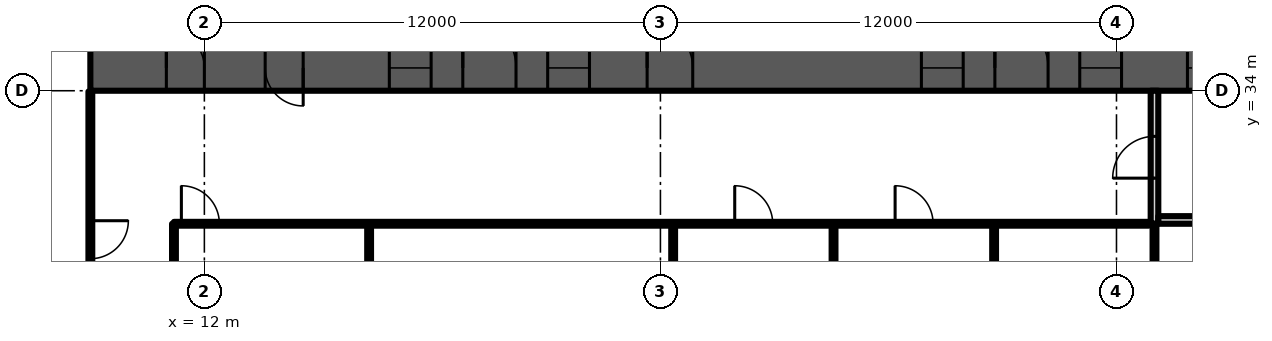
"""IFC4 building model, lengths in metres.
Left out: names, types, materials, properties, quantities, classifications, styles, units other than length and angle.
Written with IfcOpenShell. Run it as: python <this file> out.ifc"""

import sys

from ifc_helpers import new_model, si_unit, direction, frame, frame_2d, origin, place, context, subcontext, project, spatial, rectangle, extrude, element, fill, save


model = new_model("IFC4")
c1 = context("Model", 3, precision=1e-05, world=origin(), true_north=direction((0.0, 1.0)))
c2 = subcontext(c1, "Body", "Model", "MODEL_VIEW")
j1 = project(units=[si_unit("LENGTHUNIT", "METRE"), si_unit("PLANEANGLEUNIT", "RADIAN")], contexts=[c1])
p1 = place(None, origin())
s1 = spatial("IfcSite", under=j1, at=p1, CompositionType="ELEMENT")
p2 = place(p1, origin())
s2 = spatial("IfcBuilding", under=s1, at=p2, CompositionType="ELEMENT")
p3 = place(p2, frame((0.0, 0.0, 59.5)))
s3 = spatial("IfcBuildingStorey", under=s2, at=p3, CompositionType="ELEMENT", Elevation=59.5)
p4 = place(p3, frame((9.0, 34.6, 0.0), z_axis=(0.0, 0.0, 1.0), x_axis=(1.0, 0.0, 0.0)))
e1 = element("IfcWall", 1, at=p4, inside=s3, PredefinedType="SHEAR", context=c2, shape_type="SweptSolid", body=[
    extrude(rectangle(XDim=56.0, YDim=1.2, at=frame_2d((28.0, 0.0))), origin(), (0.0, 0.0, 1.0), 3.6),
])
p5 = place(p4, frame((2.0, 0.0, 0.0)))
e2 = element("IfcOpeningElement", 2, at=p5, cuts=e1, PredefinedType="OPENING", context=c2, shape_type="SweptSolid", body=[
    extrude(rectangle(XDim=1.0, YDim=2.1, at=frame_2d((0.5, 1.05))), frame((0.0, 0.61, 0.0), z_axis=(0.0, -1.0, 0.0), x_axis=(1.0, 0.0, 0.0)), (0.0, 0.0, 1.0), 1.22),
])
p6 = place(p4, frame((4.6, 0.0, 0.0)))
e3 = element("IfcOpeningElement", 3, at=p6, cuts=e1, PredefinedType="OPENING", context=c2, shape_type="SweptSolid", body=[
    extrude(rectangle(XDim=1.0, YDim=2.1, at=frame_2d((0.5, 1.05))), frame((0.0, 0.61, 0.0), z_axis=(0.0, -1.0, 0.0), x_axis=(1.0, 0.0, 0.0)), (0.0, 0.0, 1.0), 1.22),
])
p7 = place(p4, frame((7.867, 0.0, 0.0)))
e4 = element("IfcOpeningElement", 4, at=p7, cuts=e1, PredefinedType="OPENING", context=c2, shape_type="SweptSolid", body=[
    extrude(rectangle(XDim=1.1, YDim=2.1, at=frame_2d((0.55, 1.05))), frame((0.0, 0.61, 0.0), z_axis=(0.0, -1.0, 0.0), x_axis=(1.0, 0.0, 0.0)), (0.0, 0.0, 1.0), 1.22),
])
p8 = place(p4, frame((12.033, 0.0, 0.0)))
e5 = element("IfcOpeningElement", 5, at=p8, cuts=e1, PredefinedType="OPENING", context=c2, shape_type="SweptSolid", body=[
    extrude(rectangle(XDim=1.1, YDim=2.1, at=frame_2d((0.55, 1.05))), frame((0.0, 0.61, 0.0), z_axis=(0.0, -1.0, 0.0), x_axis=(1.0, 0.0, 0.0)), (0.0, 0.0, 1.0), 1.22),
])
p9 = place(p4, frame((9.8, 0.0, 0.0)))
e6 = element("IfcOpeningElement", 6, at=p9, cuts=e1, PredefinedType="OPENING", context=c2, shape_type="SweptSolid", body=[
    extrude(rectangle(XDim=1.4, YDim=2.1, at=frame_2d((0.7, 1.05))), frame((0.0, 0.61, 0.0), z_axis=(0.0, -1.0, 0.0), x_axis=(1.0, 0.0, 0.0)), (0.0, 0.0, 1.0), 1.22),
])
p10 = place(p4, frame((14.65, 0.0, 0.0)))
e7 = element("IfcOpeningElement", 7, at=p10, cuts=e1, PredefinedType="OPENING", context=c2, shape_type="SweptSolid", body=[
    extrude(rectangle(XDim=1.2, YDim=2.1, at=frame_2d((0.6, 1.05))), frame((0.0, 0.61, 0.0), z_axis=(0.0, -1.0, 0.0), x_axis=(1.0, 0.0, 0.0)), (0.0, 0.0, 1.0), 1.22),
])
p11 = place(p4, frame((21.867, 0.0, 0.0)))
e8 = element("IfcOpeningElement", 8, at=p11, cuts=e1, PredefinedType="OPENING", context=c2, shape_type="SweptSolid", body=[
    extrude(rectangle(XDim=1.1, YDim=2.1, at=frame_2d((0.55, 1.05))), frame((0.0, 0.61, 0.0), z_axis=(0.0, -1.0, 0.0), x_axis=(1.0, 0.0, 0.0)), (0.0, 0.0, 1.0), 1.22),
])
p12 = place(p4, frame((26.033, 0.0, 0.0)))
e9 = element("IfcOpeningElement", 9, at=p12, cuts=e1, PredefinedType="OPENING", context=c2, shape_type="SweptSolid", body=[
    extrude(rectangle(XDim=1.1, YDim=2.1, at=frame_2d((0.55, 1.05))), frame((0.0, 0.61, 0.0), z_axis=(0.0, -1.0, 0.0), x_axis=(1.0, 0.0, 0.0)), (0.0, 0.0, 1.0), 1.22),
])
p13 = place(p4, frame((23.8, 0.0, 0.0)))
e10 = element("IfcOpeningElement", 10, at=p13, cuts=e1, PredefinedType="OPENING", context=c2, shape_type="SweptSolid", body=[
    extrude(rectangle(XDim=1.4, YDim=2.1, at=frame_2d((0.7, 1.05))), frame((0.0, 0.61, 0.0), z_axis=(0.0, -1.0, 0.0), x_axis=(1.0, 0.0, 0.0)), (0.0, 0.0, 1.0), 1.22),
])
p14 = place(p4, frame((28.867, 0.0, 0.0)))
e11 = element("IfcOpeningElement", 11, at=p14, cuts=e1, PredefinedType="OPENING", context=c2, shape_type="SweptSolid", body=[
    extrude(rectangle(XDim=1.1, YDim=2.1, at=frame_2d((0.55, 1.05))), frame((0.0, 0.61, 0.0), z_axis=(0.0, -1.0, 0.0), x_axis=(1.0, 0.0, 0.0)), (0.0, 0.0, 1.0), 1.22),
])
p15 = place(p4, frame((33.033, 0.0, 0.0)))
e12 = element("IfcOpeningElement", 12, at=p15, cuts=e1, PredefinedType="OPENING", context=c2, shape_type="SweptSolid", body=[
    extrude(rectangle(XDim=1.1, YDim=2.1, at=frame_2d((0.55, 1.05))), frame((0.0, 0.61, 0.0), z_axis=(0.0, -1.0, 0.0), x_axis=(1.0, 0.0, 0.0)), (0.0, 0.0, 1.0), 1.22),
])
p16 = place(p4, frame((40.15, 0.0, 0.0)))
e13 = element("IfcOpeningElement", 13, at=p16, cuts=e1, PredefinedType="OPENING", context=c2, shape_type="SweptSolid", body=[
    extrude(rectangle(XDim=1.2, YDim=2.1, at=frame_2d((0.6, 1.05))), frame((0.0, 0.61, 0.0), z_axis=(0.0, -1.0, 0.0), x_axis=(1.0, 0.0, 0.0)), (0.0, 0.0, 1.0), 1.22),
])
p17 = place(p4, frame((44.8, 0.0, 0.0)))
e14 = element("IfcOpeningElement", 14, at=p17, cuts=e1, PredefinedType="OPENING", context=c2, shape_type="SweptSolid", body=[
    extrude(rectangle(XDim=1.4, YDim=2.1, at=frame_2d((0.7, 1.05))), frame((0.0, 0.61, 0.0), z_axis=(0.0, -1.0, 0.0), x_axis=(1.0, 0.0, 0.0)), (0.0, 0.0, 1.0), 1.22),
])
p18 = place(p4, frame((49.867, 0.0, 0.0)))
e15 = element("IfcOpeningElement", 15, at=p18, cuts=e1, PredefinedType="OPENING", context=c2, shape_type="SweptSolid", body=[
    extrude(rectangle(XDim=1.1, YDim=2.1, at=frame_2d((0.55, 1.05))), frame((0.0, 0.61, 0.0), z_axis=(0.0, -1.0, 0.0), x_axis=(1.0, 0.0, 0.0)), (0.0, 0.0, 1.0), 1.22),
])
p19 = place(p4, frame((53.5, 0.0, 0.0)))
e16 = element("IfcOpeningElement", 16, at=p19, cuts=e1, PredefinedType="OPENING", context=c2, shape_type="SweptSolid", body=[
    extrude(rectangle(XDim=1.1, YDim=2.1, at=frame_2d((0.55, 1.05))), frame((0.0, 0.61, 0.0), z_axis=(0.0, -1.0, 0.0), x_axis=(1.0, 0.0, 0.0)), (0.0, 0.0, 1.0), 1.22),
])
p20 = place(p4, frame((51.567, 0.0, 0.0)))
e17 = element("IfcOpeningElement", 17, at=p20, cuts=e1, PredefinedType="OPENING", context=c2, shape_type="SweptSolid", body=[
    extrude(rectangle(XDim=1.4, YDim=2.1, at=frame_2d((0.7, 1.05))), frame((0.0, 0.61, 0.0), z_axis=(0.0, -1.0, 0.0), x_axis=(1.0, 0.0, 0.0)), (0.0, 0.0, 1.0), 1.22),
])
p21 = place(p3, frame((37.0, 30.5, 0.0), z_axis=(0.0, 0.0, 1.0), x_axis=(0.0, 1.0, 0.0)))
e18 = element("IfcWall", 18, at=p21, inside=s3, PredefinedType="PARTITIONING", context=c2, shape_type="SweptSolid", body=[
    extrude(rectangle(XDim=3.5, YDim=0.2, at=frame_2d((1.75, 0.0))), origin(), (0.0, 0.0, 1.0), 3.2),
])
p22 = place(p21, frame((1.2, 0.0, 0.0)))
e19 = element("IfcOpeningElement", 19, at=p22, cuts=e18, PredefinedType="OPENING", context=c2, shape_type="SweptSolid", body=[
    extrude(rectangle(XDim=1.1, YDim=2.1, at=frame_2d((0.55, 1.05))), frame((0.0, 0.11, 0.0), z_axis=(0.0, -1.0, 0.0), x_axis=(1.0, 0.0, 0.0)), (0.0, 0.0, 1.0), 0.22),
])
p23 = place(p3, frame((37.1, 30.6, 0.0), z_axis=(0.0, 0.0, 1.0), x_axis=(1.0, 0.0, 0.0)))
e20 = element("IfcWall", 20, at=p23, inside=s3, PredefinedType="PARTITIONING", context=c2, shape_type="SweptSolid", body=[
    extrude(rectangle(XDim=2.8, YDim=0.2, at=frame_2d((1.4, 0.0))), origin(), (0.0, 0.0, 1.0), 3.2),
])
p24 = place(p3, frame((9.0, 26.05, 0.0), z_axis=(0.0, 0.0, 1.0), x_axis=(0.0, 1.0, 0.0)))
e21 = element("IfcWall", 21, at=p24, inside=s3, PredefinedType="PARTITIONING", context=c2, shape_type="SweptSolid", body=[
    extrude(rectangle(XDim=7.93, YDim=0.1, at=frame_2d((3.965, 0.0))), origin(), (0.0, 0.0, 1.0), 3.2),
])
p25 = place(p24, frame((3.53, 0.0, 0.0)))
e22 = element("IfcOpeningElement", 22, at=p25, cuts=e21, PredefinedType="OPENING", context=c2, shape_type="SweptSolid", body=[
    extrude(rectangle(XDim=1.0, YDim=2.1, at=frame_2d((0.5, 1.05))), frame((0.0, 0.06, 0.0), z_axis=(0.0, -1.0, 0.0), x_axis=(1.0, 0.0, 0.0)), (0.0, 0.0, 1.0), 0.12),
])
p26 = place(p3, frame((11.2, 23.515, 0.0), z_axis=(0.0, 0.0, 1.0), x_axis=(0.0, 1.0, 0.0)))
e23 = element("IfcWall", 23, at=p26, inside=s3, PredefinedType="PARTITIONING", context=c2, shape_type="SweptSolid", body=[
    extrude(rectangle(XDim=6.985, YDim=0.1, at=frame_2d((3.493, 0.0))), origin(), (0.0, 0.0, 1.0), 3.2),
])
p27 = place(p3, frame((11.2, 30.5, 0.0), z_axis=(0.0, 0.0, 1.0), x_axis=(1.0, 0.0, 0.0)))
e24 = element("IfcWall", 24, at=p27, inside=s3, PredefinedType="PARTITIONING", context=c2, shape_type="SweptSolid", body=[
    extrude(rectangle(XDim=25.65, YDim=0.1, at=frame_2d((12.825, 0.0))), origin(), (0.0, 0.0, 1.0), 3.2),
])
p28 = place(p27, frame((0.195, 0.0, 0.0)))
e25 = element("IfcOpeningElement", 25, at=p28, cuts=e24, PredefinedType="OPENING", context=c2, shape_type="SweptSolid", body=[
    extrude(rectangle(XDim=1.0, YDim=2.1, at=frame_2d((0.5, 1.05))), frame((0.0, 0.06, 0.0), z_axis=(0.0, -1.0, 0.0), x_axis=(1.0, 0.0, 0.0)), (0.0, 0.0, 1.0), 0.12),
])
p29 = place(p27, frame((14.755, 0.0, 0.0)))
e26 = element("IfcOpeningElement", 26, at=p29, cuts=e24, PredefinedType="OPENING", context=c2, shape_type="SweptSolid", body=[
    extrude(rectangle(XDim=1.0, YDim=2.1, at=frame_2d((0.5, 1.05))), frame((0.0, 0.06, 0.0), z_axis=(0.0, -1.0, 0.0), x_axis=(1.0, 0.0, 0.0)), (0.0, 0.0, 1.0), 0.12),
])
p30 = place(p27, frame((18.975, 0.0, 0.0)))
e27 = element("IfcOpeningElement", 27, at=p30, cuts=e24, PredefinedType="OPENING", context=c2, shape_type="SweptSolid", body=[
    extrude(rectangle(XDim=1.0, YDim=2.1, at=frame_2d((0.5, 1.05))), frame((0.0, 0.06, 0.0), z_axis=(0.0, -1.0, 0.0), x_axis=(1.0, 0.0, 0.0)), (0.0, 0.0, 1.0), 0.12),
])
for number, where, z_axis, x_axis in (
    (28, (16.335, 20.445, 0.0), (0.0, 0.0, 1.0), (0.0, 1.0, 0.0)),
    (29, (24.335, 20.445, 0.0), (0.0, 0.0, 1.0), (0.0, 1.0, 0.0)),
    (30, (28.555, 20.445, 0.0), (0.0, 0.0, 1.0), (0.0, 1.0, 0.0)),
    (31, (32.78, 20.445, 0.0), (0.0, 0.0, 1.0), (0.0, 1.0, 0.0)),
    (32, (37.0, 20.445, 0.0), (0.0, 0.0, 1.0), (0.0, 1.0, 0.0)),
):
    element("IfcWall", number, at=place(p3, frame(where, z_axis=z_axis, x_axis=x_axis)), inside=s3, PredefinedType="PARTITIONING", context=c2, shape_type="SweptSolid", body=[
        extrude(rectangle(XDim=10.055, YDim=0.1, at=frame_2d((5.027, 0.0))), origin(), (0.0, 0.0, 1.0), 3.2),
    ])
p31 = place(p5, origin())
e33 = element("IfcDoor", 33, at=p31, inside=s3, OperationType="SINGLE_SWING_LEFT", PredefinedType="DOOR", context=c2, shape_type="SweptSolid", body=[
    extrude(rectangle(XDim=1.0, YDim=2.1, at=frame_2d((0.5, 1.05))), frame((0.0, 0.6, 0.0), z_axis=(0.0, -1.0, 0.0), x_axis=(1.0, 0.0, 0.0)), (0.0, 0.0, 1.0), 1.199),
])
fill(e2, e33)
p32 = place(p6, origin())
e34 = element("IfcDoor", 34, at=p32, inside=s3, OperationType="SINGLE_SWING_RIGHT", PredefinedType="DOOR", context=c2, shape_type="SweptSolid", body=[
    extrude(rectangle(XDim=1.0, YDim=2.1, at=frame_2d((0.5, 1.05))), frame((0.0, 0.6, 0.0), z_axis=(0.0, -1.0, 0.0), x_axis=(1.0, 0.0, 0.0)), (0.0, 0.0, 1.0), 1.199),
])
fill(e3, e34)
p33 = place(p7, origin())
e35 = element("IfcDoor", 35, at=p33, inside=s3, OperationType="DOUBLE_DOOR_SLIDING", PredefinedType="DOOR", context=c2, shape_type="SweptSolid", body=[
    extrude(rectangle(XDim=1.1, YDim=2.1, at=frame_2d((0.55, 1.05))), frame((0.0, 0.025, 0.0), z_axis=(0.0, -1.0, 0.0), x_axis=(1.0, 0.0, 0.0)), (0.0, 0.0, 1.0), 0.05),
])
fill(e4, e35)
p34 = place(p8, origin())
e36 = element("IfcDoor", 36, at=p34, inside=s3, OperationType="DOUBLE_DOOR_SLIDING", PredefinedType="DOOR", context=c2, shape_type="SweptSolid", body=[
    extrude(rectangle(XDim=1.1, YDim=2.1, at=frame_2d((0.55, 1.05))), frame((0.0, 0.025, 0.0), z_axis=(0.0, -1.0, 0.0), x_axis=(1.0, 0.0, 0.0)), (0.0, 0.0, 1.0), 0.05),
])
fill(e5, e36)
p35 = place(p9, origin())
e37 = element("IfcDoor", 37, at=p35, inside=s3, OperationType="DOUBLE_DOOR_SINGLE_SWING", PredefinedType="DOOR", context=c2, shape_type="SweptSolid", body=[
    extrude(rectangle(XDim=1.4, YDim=2.1, at=frame_2d((0.7, 1.05))), frame((0.0, 0.025, 0.0), z_axis=(0.0, -1.0, 0.0), x_axis=(1.0, 0.0, 0.0)), (0.0, 0.0, 1.0), 0.05),
])
fill(e6, e37)
p36 = place(p10, origin())
e38 = element("IfcDoor", 38, at=p36, inside=s3, OperationType="SINGLE_SWING_LEFT", PredefinedType="DOOR", context=c2, shape_type="SweptSolid", body=[
    extrude(rectangle(XDim=1.2, YDim=2.1, at=frame_2d((0.6, 1.05))), frame((0.0, 0.025, 0.0), z_axis=(0.0, -1.0, 0.0), x_axis=(1.0, 0.0, 0.0)), (0.0, 0.0, 1.0), 0.05),
])
fill(e7, e38)
p37 = place(p11, origin())
e39 = element("IfcDoor", 39, at=p37, inside=s3, OperationType="DOUBLE_DOOR_SLIDING", PredefinedType="DOOR", context=c2, shape_type="SweptSolid", body=[
    extrude(rectangle(XDim=1.1, YDim=2.1, at=frame_2d((0.55, 1.05))), frame((0.0, 0.025, 0.0), z_axis=(0.0, -1.0, 0.0), x_axis=(1.0, 0.0, 0.0)), (0.0, 0.0, 1.0), 0.05),
])
fill(e8, e39)
p38 = place(p12, origin())
e40 = element("IfcDoor", 40, at=p38, inside=s3, OperationType="DOUBLE_DOOR_SLIDING", PredefinedType="DOOR", context=c2, shape_type="SweptSolid", body=[
    extrude(rectangle(XDim=1.1, YDim=2.1, at=frame_2d((0.55, 1.05))), frame((0.0, 0.025, 0.0), z_axis=(0.0, -1.0, 0.0), x_axis=(1.0, 0.0, 0.0)), (0.0, 0.0, 1.0), 0.05),
])
fill(e9, e40)
p39 = place(p13, origin())
e41 = element("IfcDoor", 41, at=p39, inside=s3, OperationType="DOUBLE_DOOR_SINGLE_SWING", PredefinedType="DOOR", context=c2, shape_type="SweptSolid", body=[
    extrude(rectangle(XDim=1.4, YDim=2.1, at=frame_2d((0.7, 1.05))), frame((0.0, 0.025, 0.0), z_axis=(0.0, -1.0, 0.0), x_axis=(1.0, 0.0, 0.0)), (0.0, 0.0, 1.0), 0.05),
])
fill(e10, e41)
p40 = place(p14, origin())
e42 = element("IfcDoor", 42, at=p40, inside=s3, OperationType="DOUBLE_DOOR_SLIDING", PredefinedType="DOOR", context=c2, shape_type="SweptSolid", body=[
    extrude(rectangle(XDim=1.1, YDim=2.1, at=frame_2d((0.55, 1.05))), frame((0.0, 0.025, 0.0), z_axis=(0.0, -1.0, 0.0), x_axis=(1.0, 0.0, 0.0)), (0.0, 0.0, 1.0), 0.05),
])
fill(e11, e42)
p41 = place(p22, origin())
e43 = element("IfcDoor", 43, at=p41, inside=s3, OperationType="SINGLE_SWING_LEFT", PredefinedType="DOOR", context=c2, shape_type="SweptSolid", body=[
    extrude(rectangle(XDim=1.1, YDim=2.1, at=frame_2d((0.55, 1.05))), frame((0.0, 0.025, 0.0), z_axis=(0.0, -1.0, 0.0), x_axis=(1.0, 0.0, 0.0)), (0.0, 0.0, 1.0), 0.05),
])
fill(e19, e43)
p42 = place(p25, origin())
e44 = element("IfcDoor", 44, at=p42, inside=s3, OperationType="SINGLE_SWING_RIGHT", PredefinedType="DOOR", context=c2, shape_type="SweptSolid", body=[
    extrude(rectangle(XDim=1.0, YDim=2.1, at=frame_2d((0.5, 1.05))), frame((0.0, 0.025, 0.0), z_axis=(0.0, -1.0, 0.0), x_axis=(1.0, 0.0, 0.0)), (0.0, 0.0, 1.0), 0.05),
])
fill(e22, e44)
p43 = place(p28, origin())
e45 = element("IfcDoor", 45, at=p43, inside=s3, OperationType="SINGLE_SWING_LEFT", PredefinedType="DOOR", context=c2, shape_type="SweptSolid", body=[
    extrude(rectangle(XDim=1.0, YDim=2.1, at=frame_2d((0.5, 1.05))), frame((0.0, 0.025, 0.0), z_axis=(0.0, -1.0, 0.0), x_axis=(1.0, 0.0, 0.0)), (0.0, 0.0, 1.0), 0.05),
])
fill(e25, e45)
p44 = place(p29, origin())
e46 = element("IfcDoor", 46, at=p44, inside=s3, OperationType="SINGLE_SWING_LEFT", PredefinedType="DOOR", context=c2, shape_type="SweptSolid", body=[
    extrude(rectangle(XDim=1.0, YDim=2.1, at=frame_2d((0.5, 1.05))), frame((0.0, 0.025, 0.0), z_axis=(0.0, -1.0, 0.0), x_axis=(1.0, 0.0, 0.0)), (0.0, 0.0, 1.0), 0.05),
])
fill(e26, e46)
p45 = place(p30, origin())
e47 = element("IfcDoor", 47, at=p45, inside=s3, OperationType="SINGLE_SWING_LEFT", PredefinedType="DOOR", context=c2, shape_type="SweptSolid", body=[
    extrude(rectangle(XDim=1.0, YDim=2.1, at=frame_2d((0.5, 1.05))), frame((0.0, 0.025, 0.0), z_axis=(0.0, -1.0, 0.0), x_axis=(1.0, 0.0, 0.0)), (0.0, 0.0, 1.0), 0.05),
])
fill(e27, e47)
save(model, sys.argv[1])
